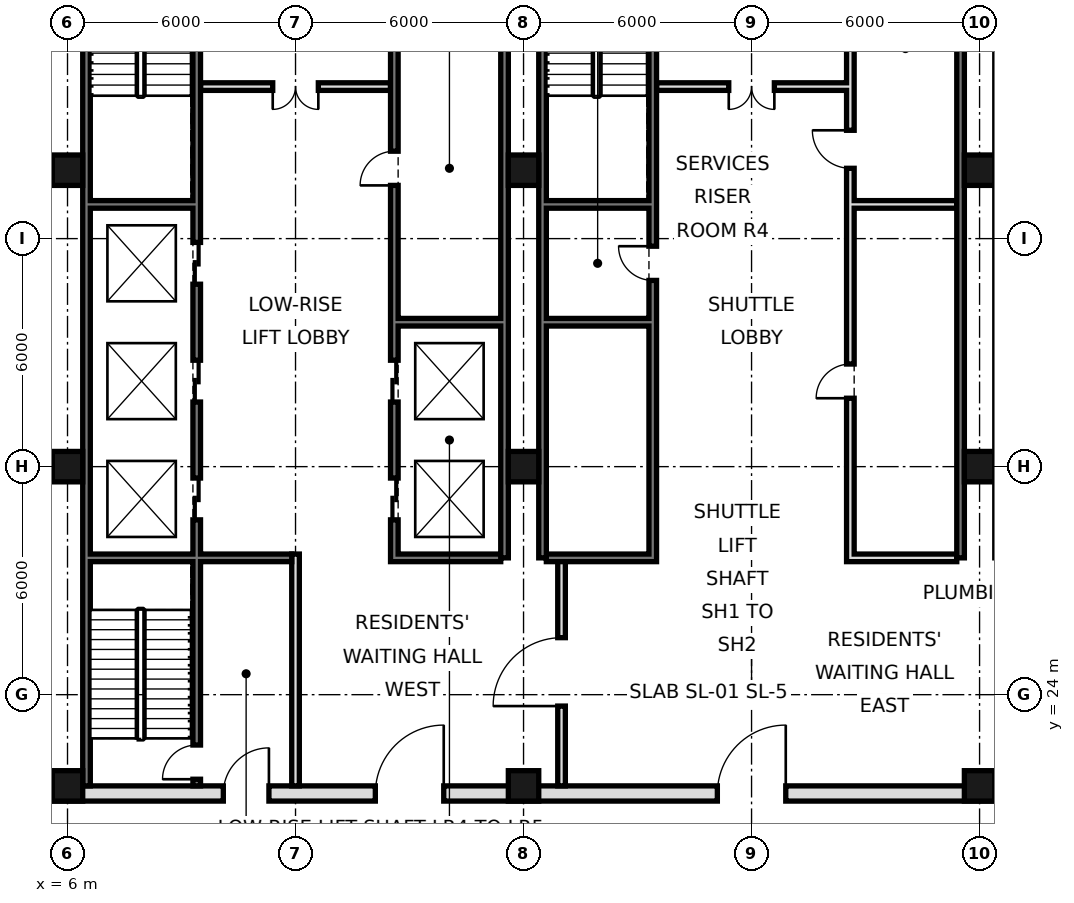
"""IFC4 building model, lengths in metres.
Left out: names, types, materials, properties, quantities, classifications, styles, units other than length and angle.
Written with IfcOpenShell. Run it as: python <this file> out.ifc"""

import sys

from ifc_helpers import new_model, si_unit, direction, frame, frame_2d, origin, origin_2d, place, context, subcontext, project, spatial, rectangle, hollow_rectangle, extrude, element, fill, save


model = new_model("IFC4")
c1 = context("Model", 3, precision=1e-05, world=origin(), true_north=direction((0.0, 1.0)))
c2 = subcontext(c1, "Body", "Model", "MODEL_VIEW")
j1 = project(units=[si_unit("LENGTHUNIT", "METRE"), si_unit("PLANEANGLEUNIT", "RADIAN")], contexts=[c1])
p1 = place(None, origin())
s1 = spatial("IfcSite", under=j1, at=p1, CompositionType="ELEMENT")
p2 = place(p1, origin())
s2 = spatial("IfcBuilding", under=s1, at=p2, CompositionType="ELEMENT")
p3 = place(p2, frame((0.0, 0.0, 30.0)))
s3 = spatial("IfcBuildingStorey", under=s2, at=p3, CompositionType="ELEMENT", Elevation=30.0)
for number, where, z_axis, x_axis in (
    (1, (6.0, 21.6, 0.0), (0.0, 0.0, 1.0), (1.0, 0.0, 0.0)),
    (2, (6.0, 30.0, 0.0), (0.0, 0.0, 1.0), (1.0, 0.0, 0.0)),
    (3, (6.0, 37.8, 0.0), (0.0, 0.0, 1.0), (1.0, 0.0, 0.0)),
    (4, (18.0, 21.6, 0.0), (0.0, 0.0, 1.0), (1.0, 0.0, 0.0)),
    (5, (18.0, 30.0, 0.0), (0.0, 0.0, 1.0), (1.0, 0.0, 0.0)),
    (6, (18.0, 37.8, 0.0), (0.0, 0.0, 1.0), (1.0, 0.0, 0.0)),
    (7, (30.0, 21.6, 0.0), (0.0, 0.0, 1.0), (1.0, 0.0, 0.0)),
    (8, (30.0, 30.0, 0.0), (0.0, 0.0, 1.0), (1.0, 0.0, 0.0)),
    (9, (30.0, 37.8, 0.0), (0.0, 0.0, 1.0), (1.0, 0.0, 0.0)),
):
    element("IfcColumn", number, at=place(p3, frame(where, z_axis=z_axis, x_axis=x_axis)), inside=s3, PredefinedType="COLUMN", context=c2, shape_type="SweptSolid", body=[
        extrude(hollow_rectangle(XDim=0.8, YDim=0.8, WallThickness=0.07, at=origin_2d()), origin(), (0.0, 0.0, 1.0), 4.8),
    ])
p4 = place(p3, frame((6.5, 21.6, 0.0), z_axis=(0.0, 0.0, 1.0), x_axis=(0.0, 1.0, 0.0)))
e10 = element("IfcWall", 10, at=p4, inside=s3, PredefinedType="SOLIDWALL", context=c2, shape_type="SweptSolid", body=[
    extrude(rectangle(XDim=23.5, YDim=0.2, at=frame_2d((11.75, 0.0))), origin(), (0.0, 0.0, 1.0), 4.4),
])
for number, where, z_axis, x_axis in (
    (11, (17.5, 27.6, 0.0), (0.0, 0.0, 1.0), (0.0, 1.0, 0.0)),
    (12, (18.5, 27.6, 0.0), (0.0, 0.0, 1.0), (0.0, 1.0, 0.0)),
    (13, (29.5, 27.6, 0.0), (0.0, 0.0, 1.0), (0.0, 1.0, 0.0)),
):
    element("IfcWall", number, at=place(p3, frame(where, z_axis=z_axis, x_axis=x_axis)), inside=s3, PredefinedType="SOLIDWALL", context=c2, shape_type="SweptSolid", body=[
        extrude(rectangle(XDim=17.5, YDim=0.2, at=frame_2d((8.75, 0.0))), origin(), (0.0, 0.0, 1.0), 4.4),
    ])
p5 = place(p3, frame((5.6, 21.4, 0.0), z_axis=(0.0, 0.0, 1.0), x_axis=(1.0, 0.0, 0.0)))
e14 = element("IfcWall", 14, at=p5, inside=s3, PredefinedType="SOLIDWALL", context=c2, shape_type="SweptSolid", body=[
    extrude(rectangle(XDim=36.8, YDim=0.4, at=frame_2d((18.4, 0.0))), origin(), (0.0, 0.0, 1.0), 4.4),
])
p6 = place(p5, frame((8.5, 0.0, 0.0)))
e15 = element("IfcOpeningElement", 15, at=p6, cuts=e14, PredefinedType="OPENING", context=c2, shape_type="SweptSolid", body=[
    extrude(rectangle(XDim=1.8, YDim=2.1, at=frame_2d((0.9, 1.05))), frame((0.0, 0.21, 0.0), z_axis=(0.0, -1.0, 0.0), x_axis=(1.0, 0.0, 0.0)), (0.0, 0.0, 1.0), 0.42),
])
p7 = place(p5, frame((17.5, 0.0, 0.0)))
e16 = element("IfcOpeningElement", 16, at=p7, cuts=e14, PredefinedType="OPENING", context=c2, shape_type="SweptSolid", body=[
    extrude(rectangle(XDim=1.8, YDim=2.1, at=frame_2d((0.9, 1.05))), frame((0.0, 0.21, 0.0), z_axis=(0.0, -1.0, 0.0), x_axis=(1.0, 0.0, 0.0)), (0.0, 0.0, 1.0), 0.42),
])
p8 = place(p5, frame((26.5, 0.0, 0.0)))
e17 = element("IfcOpeningElement", 17, at=p8, cuts=e14, PredefinedType="OPENING", context=c2, shape_type="SweptSolid", body=[
    extrude(rectangle(XDim=1.8, YDim=2.1, at=frame_2d((0.9, 1.05))), frame((0.0, 0.21, 0.0), z_axis=(0.0, -1.0, 0.0), x_axis=(1.0, 0.0, 0.0)), (0.0, 0.0, 1.0), 0.42),
])
p9 = place(p5, frame((4.5, 0.0, 0.0)))
e18 = element("IfcOpeningElement", 18, at=p9, cuts=e14, PredefinedType="OPENING", context=c2, shape_type="SweptSolid", body=[
    extrude(rectangle(XDim=1.2, YDim=2.1, at=frame_2d((0.6, 1.05))), frame((0.0, 0.21, 0.0), z_axis=(0.0, -1.0, 0.0), x_axis=(1.0, 0.0, 0.0)), (0.0, 0.0, 1.0), 0.42),
])
p10 = place(p5, frame((31.1, 0.0, 0.0)))
e19 = element("IfcOpeningElement", 19, at=p10, cuts=e14, PredefinedType="OPENING", context=c2, shape_type="SweptSolid", body=[
    extrude(rectangle(XDim=1.2, YDim=2.1, at=frame_2d((0.6, 1.05))), frame((0.0, 0.21, 0.0), z_axis=(0.0, -1.0, 0.0), x_axis=(1.0, 0.0, 0.0)), (0.0, 0.0, 1.0), 0.42),
])
p11 = place(p3, frame((19.0, 21.6, 0.0), z_axis=(0.0, 0.0, 1.0), x_axis=(0.0, 1.0, 0.0)))
e20 = element("IfcWall", 20, at=p11, inside=s3, PredefinedType="PARTITIONING", context=c2, shape_type="SweptSolid", body=[
    extrude(rectangle(XDim=6.0, YDim=0.2, at=frame_2d((3.0, 0.0))), origin(), (0.0, 0.0, 1.0), 4.4),
])
p12 = place(p11, frame((2.1, 0.0, 0.0)))
e21 = element("IfcOpeningElement", 21, at=p12, cuts=e20, PredefinedType="OPENING", context=c2, shape_type="SweptSolid", body=[
    extrude(rectangle(XDim=1.8, YDim=2.1, at=frame_2d((0.9, 1.05))), frame((0.0, 0.11, 0.0), z_axis=(0.0, -1.0, 0.0), x_axis=(1.0, 0.0, 0.0)), (0.0, 0.0, 1.0), 0.22),
])
p13 = place(p3, frame((12.0, 21.6, 0.0), z_axis=(0.0, 0.0, 1.0), x_axis=(0.0, 1.0, 0.0)))
e22 = element("IfcWall", 22, at=p13, inside=s3, PredefinedType="PARTITIONING", context=c2, shape_type="SweptSolid", body=[
    extrude(rectangle(XDim=6.1, YDim=0.2, at=frame_2d((3.05, 0.0))), origin(), (0.0, 0.0, 1.0), 4.4),
])
p14 = place(p3, frame((14.6, 27.5, 0.0), z_axis=(0.0, 0.0, 1.0), x_axis=(0.0, 1.0, 0.0)))
e23 = element("IfcWall", 23, at=p14, inside=s3, PredefinedType="SOLIDWALL", context=c2, shape_type="SweptSolid", body=[
    extrude(rectangle(XDim=17.5, YDim=0.2, at=frame_2d((8.75, 0.0))), origin(), (0.0, 0.0, 1.0), 4.4),
])
p15 = place(p14, frame((1.1, 0.0, 0.0)))
e24 = element("IfcOpeningElement", 24, at=p15, cuts=e23, PredefinedType="OPENING", context=c2, shape_type="SweptSolid", body=[
    extrude(rectangle(XDim=1.1, YDim=2.1, at=frame_2d((0.55, 1.05))), frame((0.0, 0.11, 0.0), z_axis=(0.0, -1.0, 0.0), x_axis=(1.0, 0.0, 0.0)), (0.0, 0.0, 1.0), 0.22),
])
p16 = place(p14, frame((4.2, 0.0, 0.0)))
e25 = element("IfcOpeningElement", 25, at=p16, cuts=e23, PredefinedType="OPENING", context=c2, shape_type="SweptSolid", body=[
    extrude(rectangle(XDim=1.1, YDim=2.1, at=frame_2d((0.55, 1.05))), frame((0.0, 0.11, 0.0), z_axis=(0.0, -1.0, 0.0), x_axis=(1.0, 0.0, 0.0)), (0.0, 0.0, 1.0), 0.22),
])
p17 = place(p14, frame((15.4, 0.0, 0.0)))
e26 = element("IfcOpeningElement", 26, at=p17, cuts=e23, PredefinedType="OPENING", context=c2, shape_type="SweptSolid", body=[
    extrude(rectangle(XDim=1.1, YDim=2.1, at=frame_2d((0.55, 1.05))), frame((0.0, 0.11, 0.0), z_axis=(0.0, -1.0, 0.0), x_axis=(1.0, 0.0, 0.0)), (0.0, 0.0, 1.0), 0.22),
])
p18 = place(p14, frame((9.9, 0.0, 0.0)))
e27 = element("IfcOpeningElement", 27, at=p18, cuts=e23, PredefinedType="OPENING", context=c2, shape_type="SweptSolid", body=[
    extrude(rectangle(XDim=0.9, YDim=2.1, at=frame_2d((0.45, 1.05))), frame((0.0, 0.11, 0.0), z_axis=(0.0, -1.0, 0.0), x_axis=(1.0, 0.0, 0.0)), (0.0, 0.0, 1.0), 0.22),
])
p19 = place(p3, frame((21.4, 27.5, 0.0), z_axis=(0.0, 0.0, 1.0), x_axis=(0.0, 1.0, 0.0)))
e28 = element("IfcWall", 28, at=p19, inside=s3, PredefinedType="SOLIDWALL", context=c2, shape_type="SweptSolid", body=[
    extrude(rectangle(XDim=17.5, YDim=0.2, at=frame_2d((8.75, 0.0))), origin(), (0.0, 0.0, 1.0), 4.4),
])
p20 = place(p19, frame((16.2, 0.0, 0.0)))
e29 = element("IfcOpeningElement", 29, at=p20, cuts=e28, PredefinedType="OPENING", context=c2, shape_type="SweptSolid", body=[
    extrude(rectangle(XDim=1.0, YDim=2.1, at=frame_2d((0.5, 1.05))), frame((0.0, 0.11, 0.0), z_axis=(0.0, -1.0, 0.0), x_axis=(1.0, 0.0, 0.0)), (0.0, 0.0, 1.0), 0.22),
])
p21 = place(p19, frame((7.4, 0.0, 0.0)))
e30 = element("IfcOpeningElement", 30, at=p21, cuts=e28, PredefinedType="OPENING", context=c2, shape_type="SweptSolid", body=[
    extrude(rectangle(XDim=0.9, YDim=2.1, at=frame_2d((0.45, 1.05))), frame((0.0, 0.11, 0.0), z_axis=(0.0, -1.0, 0.0), x_axis=(1.0, 0.0, 0.0)), (0.0, 0.0, 1.0), 0.22),
])
p22 = place(p3, frame((26.6, 27.5, 0.0), z_axis=(0.0, 0.0, 1.0), x_axis=(0.0, 1.0, 0.0)))
e31 = element("IfcWall", 31, at=p22, inside=s3, PredefinedType="SOLIDWALL", context=c2, shape_type="SweptSolid", body=[
    extrude(rectangle(XDim=17.5, YDim=0.2, at=frame_2d((8.75, 0.0))), origin(), (0.0, 0.0, 1.0), 4.4),
])
p23 = place(p22, frame((4.3, 0.0, 0.0)))
e32 = element("IfcOpeningElement", 32, at=p23, cuts=e31, PredefinedType="OPENING", context=c2, shape_type="SweptSolid", body=[
    extrude(rectangle(XDim=0.9, YDim=2.1, at=frame_2d((0.45, 1.05))), frame((0.0, 0.11, 0.0), z_axis=(0.0, -1.0, 0.0), x_axis=(1.0, 0.0, 0.0)), (0.0, 0.0, 1.0), 0.22),
])
p24 = place(p22, frame((10.35, 0.0, 0.0)))
e33 = element("IfcOpeningElement", 33, at=p24, cuts=e31, PredefinedType="OPENING", context=c2, shape_type="SweptSolid", body=[
    extrude(rectangle(XDim=1.0, YDim=2.1, at=frame_2d((0.5, 1.05))), frame((0.0, 0.11, 0.0), z_axis=(0.0, -1.0, 0.0), x_axis=(1.0, 0.0, 0.0)), (0.0, 0.0, 1.0), 0.22),
])
p25 = place(p3, frame((9.4, 21.6, 0.0), z_axis=(0.0, 0.0, 1.0), x_axis=(0.0, 1.0, 0.0)))
e34 = element("IfcWall", 34, at=p25, inside=s3, PredefinedType="SOLIDWALL", context=c2, shape_type="SweptSolid", body=[
    extrude(rectangle(XDim=23.4, YDim=0.2, at=frame_2d((11.7, 0.0))), origin(), (0.0, 0.0, 1.0), 4.4),
])
p26 = place(p25, frame((7.0, 0.0, 0.0)))
e35 = element("IfcOpeningElement", 35, at=p26, cuts=e34, PredefinedType="OPENING", context=c2, shape_type="SweptSolid", body=[
    extrude(rectangle(XDim=1.1, YDim=2.1, at=frame_2d((0.55, 1.05))), frame((0.0, 0.11, 0.0), z_axis=(0.0, -1.0, 0.0), x_axis=(1.0, 0.0, 0.0)), (0.0, 0.0, 1.0), 0.22),
])
p27 = place(p25, frame((10.1, 0.0, 0.0)))
e36 = element("IfcOpeningElement", 36, at=p27, cuts=e34, PredefinedType="OPENING", context=c2, shape_type="SweptSolid", body=[
    extrude(rectangle(XDim=1.1, YDim=2.1, at=frame_2d((0.55, 1.05))), frame((0.0, 0.11, 0.0), z_axis=(0.0, -1.0, 0.0), x_axis=(1.0, 0.0, 0.0)), (0.0, 0.0, 1.0), 0.22),
])
p28 = place(p25, frame((13.2, 0.0, 0.0)))
e37 = element("IfcOpeningElement", 37, at=p28, cuts=e34, PredefinedType="OPENING", context=c2, shape_type="SweptSolid", body=[
    extrude(rectangle(XDim=1.1, YDim=2.1, at=frame_2d((0.55, 1.05))), frame((0.0, 0.11, 0.0), z_axis=(0.0, -1.0, 0.0), x_axis=(1.0, 0.0, 0.0)), (0.0, 0.0, 1.0), 0.22),
])
p29 = place(p25, frame((22.1, 0.0, 0.0)))
e38 = element("IfcOpeningElement", 38, at=p29, cuts=e34, PredefinedType="OPENING", context=c2, shape_type="SweptSolid", body=[
    extrude(rectangle(XDim=1.0, YDim=2.1, at=frame_2d((0.5, 1.05))), frame((0.0, 0.11, 0.0), z_axis=(0.0, -1.0, 0.0), x_axis=(1.0, 0.0, 0.0)), (0.0, 0.0, 1.0), 0.22),
])
p30 = place(p25, frame((0.175, 0.0, 0.0)))
e39 = element("IfcOpeningElement", 39, at=p30, cuts=e34, PredefinedType="OPENING", context=c2, shape_type="SweptSolid", body=[
    extrude(rectangle(XDim=0.9, YDim=2.1, at=frame_2d((0.45, 1.05))), frame((0.0, 0.11, 0.0), z_axis=(0.0, -1.0, 0.0), x_axis=(1.0, 0.0, 0.0)), (0.0, 0.0, 1.0), 0.22),
])
for number, where, z_axis, x_axis in (
    (40, (14.7, 27.6, 0.0), (0.0, 0.0, 1.0), (1.0, 0.0, 0.0)),
    (41, (18.6, 27.6, 0.0), (0.0, 0.0, 1.0), (1.0, 0.0, 0.0)),
    (42, (26.7, 27.6, 0.0), (0.0, 0.0, 1.0), (1.0, 0.0, 0.0)),
):
    element("IfcWall", number, at=place(p3, frame(where, z_axis=z_axis, x_axis=x_axis)), inside=s3, PredefinedType="SOLIDWALL", context=c2, shape_type="SweptSolid", body=[
        extrude(rectangle(XDim=2.7, YDim=0.2, at=frame_2d((1.35, 0.0))), origin(), (0.0, 0.0, 1.0), 4.4),
    ])
p31 = place(p3, frame((6.6, 27.6, 0.0), z_axis=(0.0, 0.0, 1.0), x_axis=(1.0, 0.0, 0.0)))
e43 = element("IfcWall", 43, at=p31, inside=s3, PredefinedType="SOLIDWALL", context=c2, shape_type="SweptSolid", body=[
    extrude(rectangle(XDim=5.3, YDim=0.2, at=frame_2d((2.65, 0.0))), origin(), (0.0, 0.0, 1.0), 4.4),
])
for number, where, z_axis, x_axis in (
    (44, (14.7, 33.8, 0.0), (0.0, 0.0, 1.0), (1.0, 0.0, 0.0)),
    (45, (18.6, 33.8, 0.0), (0.0, 0.0, 1.0), (1.0, 0.0, 0.0)),
    (46, (18.6, 36.9, 0.0), (0.0, 0.0, 1.0), (1.0, 0.0, 0.0)),
    (47, (26.7, 36.9, 0.0), (0.0, 0.0, 1.0), (1.0, 0.0, 0.0)),
    (48, (6.6, 36.9, 0.0), (0.0, 0.0, 1.0), (1.0, 0.0, 0.0)),
):
    element("IfcWall", number, at=place(p3, frame(where, z_axis=z_axis, x_axis=x_axis)), inside=s3, PredefinedType="SOLIDWALL", context=c2, shape_type="SweptSolid", body=[
        extrude(rectangle(XDim=2.7, YDim=0.2, at=frame_2d((1.35, 0.0))), origin(), (0.0, 0.0, 1.0), 4.4),
    ])
p32 = place(p3, frame((21.5, 40.0, 0.0), z_axis=(0.0, 0.0, 1.0), x_axis=(1.0, 0.0, 0.0)))
e49 = element("IfcWall", 49, at=p32, inside=s3, PredefinedType="PARTITIONING", context=c2, shape_type="SweptSolid", body=[
    extrude(rectangle(XDim=5.0, YDim=0.2, at=frame_2d((2.5, 0.0))), origin(), (0.0, 0.0, 1.0), 4.4),
])
p33 = place(p32, frame((1.9, 0.0, 0.0)))
e50 = element("IfcOpeningElement", 50, at=p33, cuts=e49, PredefinedType="OPENING", context=c2, shape_type="SweptSolid", body=[
    extrude(rectangle(XDim=1.2, YDim=2.1, at=frame_2d((0.6, 1.05))), frame((0.0, 0.11, 0.0), z_axis=(0.0, -1.0, 0.0), x_axis=(1.0, 0.0, 0.0)), (0.0, 0.0, 1.0), 0.22),
])
p34 = place(p3, frame((9.5, 40.0, 0.0), z_axis=(0.0, 0.0, 1.0), x_axis=(1.0, 0.0, 0.0)))
e51 = element("IfcWall", 51, at=p34, inside=s3, PredefinedType="PARTITIONING", context=c2, shape_type="SweptSolid", body=[
    extrude(rectangle(XDim=5.0, YDim=0.2, at=frame_2d((2.5, 0.0))), origin(), (0.0, 0.0, 1.0), 4.4),
])
p35 = place(p34, frame((1.9, 0.0, 0.0)))
e52 = element("IfcOpeningElement", 52, at=p35, cuts=e51, PredefinedType="OPENING", context=c2, shape_type="SweptSolid", body=[
    extrude(rectangle(XDim=1.2, YDim=2.1, at=frame_2d((0.6, 1.05))), frame((0.0, 0.11, 0.0), z_axis=(0.0, -1.0, 0.0), x_axis=(1.0, 0.0, 0.0)), (0.0, 0.0, 1.0), 0.22),
])
p36 = place(p6, frame((1.8, 0.0, 0.0), z_axis=(0.0, 0.0, 1.0), x_axis=(-1.0, 0.0, 0.0)))
e53 = element("IfcDoor", 53, at=p36, inside=s3, OperationType="SINGLE_SWING_LEFT", PredefinedType="DOOR", context=c2, shape_type="SweptSolid", body=[
    extrude(rectangle(XDim=1.8, YDim=2.1, at=frame_2d((0.9, 1.05))), frame((0.0, 0.025, 0.0), z_axis=(0.0, -1.0, 0.0), x_axis=(1.0, 0.0, 0.0)), (0.0, 0.0, 1.0), 0.05),
])
fill(e15, e53)
p37 = place(p12, origin())
e54 = element("IfcDoor", 54, at=p37, inside=s3, OperationType="SINGLE_SWING_LEFT", PredefinedType="DOOR", context=c2, shape_type="SweptSolid", body=[
    extrude(rectangle(XDim=1.8, YDim=2.1, at=frame_2d((0.9, 1.05))), frame((0.0, 0.025, 0.0), z_axis=(0.0, -1.0, 0.0), x_axis=(1.0, 0.0, 0.0)), (0.0, 0.0, 1.0), 0.05),
])
fill(e21, e54)
p38 = place(p7, frame((1.8, 0.0, 0.0), z_axis=(0.0, 0.0, 1.0), x_axis=(-1.0, 0.0, 0.0)))
e55 = element("IfcDoor", 55, at=p38, inside=s3, OperationType="SINGLE_SWING_LEFT", PredefinedType="DOOR", context=c2, shape_type="SweptSolid", body=[
    extrude(rectangle(XDim=1.8, YDim=2.1, at=frame_2d((0.9, 1.05))), frame((0.0, 0.025, 0.0), z_axis=(0.0, -1.0, 0.0), x_axis=(1.0, 0.0, 0.0)), (0.0, 0.0, 1.0), 0.05),
])
fill(e16, e55)
p39 = place(p9, frame((1.2, 0.0, 0.0), z_axis=(0.0, 0.0, 1.0), x_axis=(-1.0, 0.0, 0.0)))
e56 = element("IfcDoor", 56, at=p39, inside=s3, OperationType="SINGLE_SWING_LEFT", PredefinedType="DOOR", context=c2, shape_type="SweptSolid", body=[
    extrude(rectangle(XDim=1.2, YDim=2.1, at=frame_2d((0.6, 1.05))), frame((0.0, 0.025, 0.0), z_axis=(0.0, -1.0, 0.0), x_axis=(1.0, 0.0, 0.0)), (0.0, 0.0, 1.0), 0.05),
])
fill(e18, e56)
p40 = place(p35, frame((1.2, 0.0, 0.0), z_axis=(0.0, 0.0, 1.0), x_axis=(-1.0, 0.0, 0.0)))
e57 = element("IfcDoor", 57, at=p40, inside=s3, OperationType="DOUBLE_DOOR_SINGLE_SWING", PredefinedType="DOOR", context=c2, shape_type="SweptSolid", body=[
    extrude(rectangle(XDim=1.2, YDim=2.1, at=frame_2d((0.6, 1.05))), frame((0.0, 0.025, 0.0), z_axis=(0.0, -1.0, 0.0), x_axis=(1.0, 0.0, 0.0)), (0.0, 0.0, 1.0), 0.05),
])
fill(e52, e57)
p41 = place(p33, frame((1.2, 0.0, 0.0), z_axis=(0.0, 0.0, 1.0), x_axis=(-1.0, 0.0, 0.0)))
e58 = element("IfcDoor", 58, at=p41, inside=s3, OperationType="DOUBLE_DOOR_SINGLE_SWING", PredefinedType="DOOR", context=c2, shape_type="SweptSolid", body=[
    extrude(rectangle(XDim=1.2, YDim=2.1, at=frame_2d((0.6, 1.05))), frame((0.0, 0.025, 0.0), z_axis=(0.0, -1.0, 0.0), x_axis=(1.0, 0.0, 0.0)), (0.0, 0.0, 1.0), 0.05),
])
fill(e50, e58)
p42 = place(p15, origin())
e59 = element("IfcDoor", 59, at=p42, inside=s3, OperationType="DOUBLE_DOOR_SLIDING", PredefinedType="DOOR", context=c2, shape_type="SweptSolid", body=[
    extrude(rectangle(XDim=1.1, YDim=2.1, at=frame_2d((0.55, 1.05))), frame((0.0, 0.025, 0.0), z_axis=(0.0, -1.0, 0.0), x_axis=(1.0, 0.0, 0.0)), (0.0, 0.0, 1.0), 0.05),
])
fill(e24, e59)
p43 = place(p16, origin())
e60 = element("IfcDoor", 60, at=p43, inside=s3, OperationType="DOUBLE_DOOR_SLIDING", PredefinedType="DOOR", context=c2, shape_type="SweptSolid", body=[
    extrude(rectangle(XDim=1.1, YDim=2.1, at=frame_2d((0.55, 1.05))), frame((0.0, 0.025, 0.0), z_axis=(0.0, -1.0, 0.0), x_axis=(1.0, 0.0, 0.0)), (0.0, 0.0, 1.0), 0.05),
])
fill(e25, e60)
p44 = place(p26, origin())
e61 = element("IfcDoor", 61, at=p44, inside=s3, OperationType="DOUBLE_DOOR_SLIDING", PredefinedType="DOOR", context=c2, shape_type="SweptSolid", body=[
    extrude(rectangle(XDim=1.1, YDim=2.1, at=frame_2d((0.55, 1.05))), frame((0.0, 0.025, 0.0), z_axis=(0.0, -1.0, 0.0), x_axis=(1.0, 0.0, 0.0)), (0.0, 0.0, 1.0), 0.05),
])
fill(e35, e61)
p45 = place(p27, origin())
e62 = element("IfcDoor", 62, at=p45, inside=s3, OperationType="DOUBLE_DOOR_SLIDING", PredefinedType="DOOR", context=c2, shape_type="SweptSolid", body=[
    extrude(rectangle(XDim=1.1, YDim=2.1, at=frame_2d((0.55, 1.05))), frame((0.0, 0.025, 0.0), z_axis=(0.0, -1.0, 0.0), x_axis=(1.0, 0.0, 0.0)), (0.0, 0.0, 1.0), 0.05),
])
fill(e36, e62)
p46 = place(p28, origin())
e63 = element("IfcDoor", 63, at=p46, inside=s3, OperationType="DOUBLE_DOOR_SLIDING", PredefinedType="DOOR", context=c2, shape_type="SweptSolid", body=[
    extrude(rectangle(XDim=1.1, YDim=2.1, at=frame_2d((0.55, 1.05))), frame((0.0, 0.025, 0.0), z_axis=(0.0, -1.0, 0.0), x_axis=(1.0, 0.0, 0.0)), (0.0, 0.0, 1.0), 0.05),
])
fill(e37, e63)
p47 = place(p30, origin())
e64 = element("IfcDoor", 64, at=p47, inside=s3, OperationType="SINGLE_SWING_LEFT", PredefinedType="DOOR", context=c2, shape_type="SweptSolid", body=[
    extrude(rectangle(XDim=0.9, YDim=2.1, at=frame_2d((0.45, 1.05))), frame((0.0, 0.025, 0.0), z_axis=(0.0, -1.0, 0.0), x_axis=(1.0, 0.0, 0.0)), (0.0, 0.0, 1.0), 0.05),
])
fill(e39, e64)
p48 = place(p18, origin())
e65 = element("IfcDoor", 65, at=p48, inside=s3, OperationType="SINGLE_SWING_LEFT", PredefinedType="DOOR", context=c2, shape_type="SweptSolid", body=[
    extrude(rectangle(XDim=0.9, YDim=2.1, at=frame_2d((0.45, 1.05))), frame((0.0, 0.025, 0.0), z_axis=(0.0, -1.0, 0.0), x_axis=(1.0, 0.0, 0.0)), (0.0, 0.0, 1.0), 0.05),
])
fill(e27, e65)
p49 = place(p21, frame((0.9, 0.0, 0.0), z_axis=(0.0, 0.0, 1.0), x_axis=(-1.0, 0.0, 0.0)))
e66 = element("IfcDoor", 66, at=p49, inside=s3, OperationType="SINGLE_SWING_LEFT", PredefinedType="DOOR", context=c2, shape_type="SweptSolid", body=[
    extrude(rectangle(XDim=0.9, YDim=2.1, at=frame_2d((0.45, 1.05))), frame((0.0, 0.025, 0.0), z_axis=(0.0, -1.0, 0.0), x_axis=(1.0, 0.0, 0.0)), (0.0, 0.0, 1.0), 0.05),
])
fill(e30, e66)
p50 = place(p23, origin())
e67 = element("IfcDoor", 67, at=p50, inside=s3, OperationType="SINGLE_SWING_LEFT", PredefinedType="DOOR", context=c2, shape_type="SweptSolid", body=[
    extrude(rectangle(XDim=0.9, YDim=2.1, at=frame_2d((0.45, 1.05))), frame((0.0, 0.025, 0.0), z_axis=(0.0, -1.0, 0.0), x_axis=(1.0, 0.0, 0.0)), (0.0, 0.0, 1.0), 0.05),
])
fill(e32, e67)
p51 = place(p24, frame((1.0, 0.0, 0.0), z_axis=(0.0, 0.0, 1.0), x_axis=(-1.0, 0.0, 0.0)))
e68 = element("IfcDoor", 68, at=p51, inside=s3, OperationType="SINGLE_SWING_LEFT", PredefinedType="DOOR", context=c2, shape_type="SweptSolid", body=[
    extrude(rectangle(XDim=1.0, YDim=2.1, at=frame_2d((0.5, 1.05))), frame((0.0, 0.025, 0.0), z_axis=(0.0, -1.0, 0.0), x_axis=(1.0, 0.0, 0.0)), (0.0, 0.0, 1.0), 0.05),
])
fill(e33, e68)
save(model, sys.argv[1])
